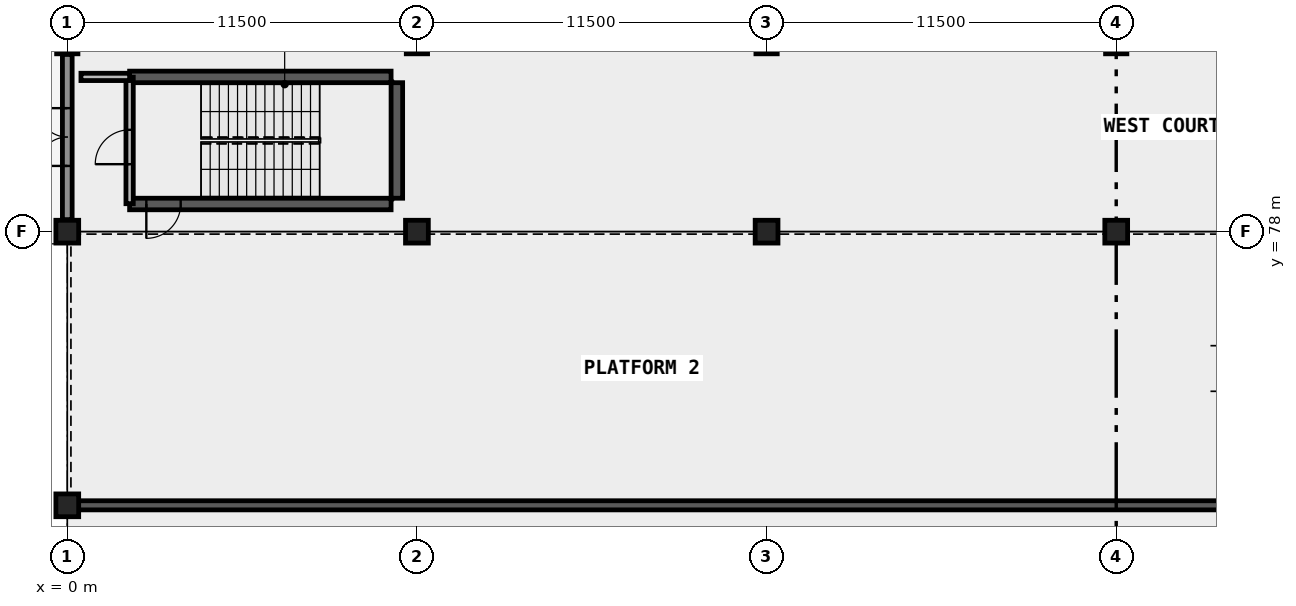
"""IFC4 building model, lengths in metres.
Left out: names, types, materials, properties, quantities, classifications, styles, units other than length and angle.
Written with IfcOpenShell. Run it as: python <this file> out.ifc"""

import sys

from ifc_helpers import new_model, si_unit, direction, frame, frame_2d, origin, origin_2d, place, context, subcontext, project, spatial, rectangle, extrude, element, fill, save


model = new_model("IFC4")
c1 = context("Model", 3, precision=1e-05, world=origin(), true_north=direction((0.0, 1.0)))
c2 = subcontext(c1, "Body", "Model", "MODEL_VIEW")
j1 = project(units=[si_unit("LENGTHUNIT", "METRE"), si_unit("PLANEANGLEUNIT", "RADIAN")], contexts=[c1])
p1 = place(None, origin())
s1 = spatial("IfcSite", under=j1, at=p1, CompositionType="ELEMENT")
p2 = place(p1, origin())
s2 = spatial("IfcBuilding", under=s1, at=p2, CompositionType="ELEMENT")
p3 = place(p2, origin())
s3 = spatial("IfcBuildingStorey", under=s2, at=p3, CompositionType="ELEMENT", Elevation=0.0)
p4 = place(p3, frame((0.0, 78.0, 0.0), z_axis=(0.0, 0.0, 1.0), x_axis=(1.0, 0.0, 0.0)))
e1 = element("IfcColumn", 1, at=p4, inside=s3, PredefinedType="COLUMN", context=c2, shape_type="SweptSolid", body=[
    extrude(rectangle(XDim=0.75, YDim=0.75, at=origin_2d()), origin(), (0.0, 0.0, 1.0), 4.2),
])
p5 = place(p3, frame((0.0, 84.2, 0.0), z_axis=(0.0, 0.0, 1.0), x_axis=(1.0, 0.0, 0.0)))
e2 = element("IfcColumn", 2, at=p5, inside=s3, PredefinedType="COLUMN", context=c2, shape_type="SweptSolid", body=[
    extrude(rectangle(XDim=0.7, YDim=0.7, at=origin_2d()), origin(), (0.0, 0.0, 1.0), 4.2),
])
p6 = place(p3, frame((11.5, 78.0, 0.0), z_axis=(0.0, 0.0, 1.0), x_axis=(1.0, 0.0, 0.0)))
e3 = element("IfcColumn", 3, at=p6, inside=s3, PredefinedType="COLUMN", context=c2, shape_type="SweptSolid", body=[
    extrude(rectangle(XDim=0.75, YDim=0.75, at=origin_2d()), origin(), (0.0, 0.0, 1.0), 4.2),
])
p7 = place(p3, frame((11.5, 84.2, 0.0), z_axis=(0.0, 0.0, 1.0), x_axis=(1.0, 0.0, 0.0)))
e4 = element("IfcColumn", 4, at=p7, inside=s3, PredefinedType="COLUMN", context=c2, shape_type="SweptSolid", body=[
    extrude(rectangle(XDim=0.7, YDim=0.7, at=origin_2d()), origin(), (0.0, 0.0, 1.0), 4.2),
])
p8 = place(p3, frame((23.0, 78.0, 0.0), z_axis=(0.0, 0.0, 1.0), x_axis=(1.0, 0.0, 0.0)))
e5 = element("IfcColumn", 5, at=p8, inside=s3, PredefinedType="COLUMN", context=c2, shape_type="SweptSolid", body=[
    extrude(rectangle(XDim=0.75, YDim=0.75, at=origin_2d()), origin(), (0.0, 0.0, 1.0), 4.2),
])
p9 = place(p3, frame((23.0, 84.2, 0.0), z_axis=(0.0, 0.0, 1.0), x_axis=(1.0, 0.0, 0.0)))
e6 = element("IfcColumn", 6, at=p9, inside=s3, PredefinedType="COLUMN", context=c2, shape_type="SweptSolid", body=[
    extrude(rectangle(XDim=0.7, YDim=0.7, at=origin_2d()), origin(), (0.0, 0.0, 1.0), 4.2),
])
p10 = place(p3, frame((34.5, 78.0, 0.0), z_axis=(0.0, 0.0, 1.0), x_axis=(1.0, 0.0, 0.0)))
e7 = element("IfcColumn", 7, at=p10, inside=s3, PredefinedType="COLUMN", context=c2, shape_type="SweptSolid", body=[
    extrude(rectangle(XDim=0.75, YDim=0.75, at=origin_2d()), origin(), (0.0, 0.0, 1.0), 4.2),
])
p11 = place(p3, frame((34.5, 84.2, 0.0), z_axis=(0.0, 0.0, 1.0), x_axis=(1.0, 0.0, 0.0)))
e8 = element("IfcColumn", 8, at=p11, inside=s3, PredefinedType="COLUMN", context=c2, shape_type="SweptSolid", body=[
    extrude(rectangle(XDim=0.7, YDim=0.7, at=origin_2d()), origin(), (0.0, 0.0, 1.0), 4.2),
])
p12 = place(p3, frame((2.05, 78.91, 0.0), z_axis=(0.0, 0.0, 1.0), x_axis=(1.0, 0.0, 0.0)))
e9 = element("IfcWall", 9, at=p12, inside=s3, PredefinedType="SHEAR", context=c2, shape_type="SweptSolid", body=[
    extrude(rectangle(XDim=8.6, YDim=0.38, at=frame_2d((4.3, 0.0))), origin(), (0.0, 0.0, 1.0), 4.2),
])
p13 = place(p12, frame((0.55, 0.0, 0.0)))
e10 = element("IfcOpeningElement", 10, at=p13, cuts=e9, PredefinedType="OPENING", context=c2, shape_type="SweptSolid", body=[
    extrude(rectangle(XDim=1.13, YDim=2.15, at=frame_2d((0.565, 1.075))), frame((0.0, 0.2, 0.0), z_axis=(0.0, -1.0, 0.0), x_axis=(1.0, 0.0, 0.0)), (0.0, 0.0, 1.0), 0.4),
])
p14 = place(p3, frame((2.05, 83.09, 0.0), z_axis=(0.0, 0.0, 1.0), x_axis=(1.0, 0.0, 0.0)))
e11 = element("IfcWall", 11, at=p14, inside=s3, PredefinedType="SHEAR", context=c2, shape_type="SweptSolid", body=[
    extrude(rectangle(XDim=8.6, YDim=0.38, at=frame_2d((4.3, 0.0))), origin(), (0.0, 0.0, 1.0), 4.2),
])
p15 = place(p3, frame((10.84, 79.1, 0.0), z_axis=(0.0, 0.0, 1.0), x_axis=(0.0, 1.0, 0.0)))
e12 = element("IfcWall", 12, at=p15, inside=s3, PredefinedType="SHEAR", context=c2, shape_type="SweptSolid", body=[
    extrude(rectangle(XDim=3.8, YDim=0.38, at=frame_2d((1.9, 0.0))), origin(), (0.0, 0.0, 1.0), 4.2),
])
p16 = place(p3, frame((0.0, 69.0, -0.32), z_axis=(0.0, 0.0, 1.0), x_axis=(1.0, 0.0, 0.0)))
e13 = element("IfcWall", 13, at=p16, inside=s3, PredefinedType="SHEAR", context=c2, shape_type="SweptSolid", body=[
    extrude(rectangle(XDim=92.0, YDim=0.3, at=frame_2d((46.0, 0.0))), origin(), (0.0, 0.0, 1.0), 1.27),
])
p17 = place(p3, frame((0.0, 69.0, 0.55), z_axis=(0.0, 0.0, 1.0), x_axis=(1.0, 0.0, 0.0)))
e14 = element("IfcColumn", 14, at=p17, inside=s3, PredefinedType="COLUMN", context=c2, shape_type="SweptSolid", body=[
    extrude(rectangle(XDim=0.75, YDim=0.75, at=origin_2d()), origin(), (0.0, 0.0, 1.0), 3.65),
])
p18 = place(p3, frame((0.0, 78.395, 0.0), z_axis=(0.0, 0.0, 1.0), x_axis=(0.0, 1.0, 0.0)))
e15 = element("IfcWall", 15, at=p18, inside=s3, PredefinedType="SOLIDWALL", context=c2, shape_type="SweptSolid", body=[
    extrude(rectangle(XDim=5.435, YDim=0.32, at=frame_2d((2.718, 0.0))), origin(), (0.0, 0.0, 1.0), 3.2),
])
p19 = place(p18, frame((1.768, 0.0, 0.0)))
e16 = element("IfcOpeningElement", 16, at=p19, cuts=e15, PredefinedType="OPENING", context=c2, shape_type="SweptSolid", body=[
    extrude(rectangle(XDim=1.9, YDim=2.2, at=frame_2d((0.95, 1.1))), frame((0.0, 0.17, 0.0), z_axis=(0.0, -1.0, 0.0), x_axis=(1.0, 0.0, 0.0)), (0.0, 0.0, 1.0), 0.34),
])
p20 = place(p3, frame((2.05, 78.92, 0.0), z_axis=(0.0, 0.0, 1.0), x_axis=(0.0, 1.0, 0.0)))
e17 = element("IfcWall", 17, at=p20, inside=s3, PredefinedType="SOLIDWALL", context=c2, shape_type="SweptSolid", body=[
    extrude(rectangle(XDim=4.16, YDim=0.24, at=frame_2d((2.08, 0.0))), origin(), (0.0, 0.0, 1.0), 3.88),
])
p21 = place(p20, frame((1.3, 0.0, 0.0)))
e18 = element("IfcOpeningElement", 18, at=p21, cuts=e17, PredefinedType="OPENING", context=c2, shape_type="SweptSolid", body=[
    extrude(rectangle(XDim=1.13, YDim=2.15, at=frame_2d((0.565, 1.075))), frame((0.0, 0.13, 0.0), z_axis=(0.0, -1.0, 0.0), x_axis=(1.0, 0.0, 0.0)), (0.0, 0.0, 1.0), 0.26),
])
p22 = place(p3, frame((0.45, 83.09, 0.0), z_axis=(0.0, 0.0, 1.0), x_axis=(1.0, 0.0, 0.0)))
e19 = element("IfcWall", 19, at=p22, inside=s3, PredefinedType="SOLIDWALL", context=c2, shape_type="SweptSolid", body=[
    extrude(rectangle(XDim=1.6, YDim=0.24, at=frame_2d((0.8, 0.0))), origin(), (0.0, 0.0, 1.0), 3.88),
])
p23 = place(p19, origin())
e20 = element("IfcDoor", 20, at=p23, inside=s3, OperationType="DOUBLE_DOOR_SINGLE_SWING", PredefinedType="DOOR", context=c2, shape_type="SweptSolid", body=[
    extrude(rectangle(XDim=1.9, YDim=2.2, at=frame_2d((0.95, 1.1))), frame((0.0, 0.025, 0.0), z_axis=(0.0, -1.0, 0.0), x_axis=(1.0, 0.0, 0.0)), (0.0, 0.0, 1.0), 0.05),
])
fill(e16, e20)
p24 = place(p21, origin())
e21 = element("IfcDoor", 21, at=p24, inside=s3, OperationType="SINGLE_SWING_LEFT", PredefinedType="DOOR", context=c2, shape_type="SweptSolid", body=[
    extrude(rectangle(XDim=1.13, YDim=2.15, at=frame_2d((0.565, 1.075))), frame((0.0, 0.025, 0.0), z_axis=(0.0, -1.0, 0.0), x_axis=(1.0, 0.0, 0.0)), (0.0, 0.0, 1.0), 0.05),
])
fill(e18, e21)
p25 = place(p13, frame((0.565, 0.0, 0.0), z_axis=(0.0, 0.0, 1.0), x_axis=(-1.0, 0.0, 0.0)))
e22 = element("IfcDoor", 22, at=p25, inside=s3, OperationType="SINGLE_SWING_LEFT", PredefinedType="DOOR", context=c2, shape_type="SweptSolid", body=[
    extrude(rectangle(XDim=1.13, YDim=2.15, at=frame_2d((0.0, 1.075))), frame((0.0, 0.025, 0.0), z_axis=(0.0, -1.0, 0.0), x_axis=(1.0, 0.0, 0.0)), (0.0, 0.0, 1.0), 0.05),
])
fill(e10, e22)
save(model, sys.argv[1])
